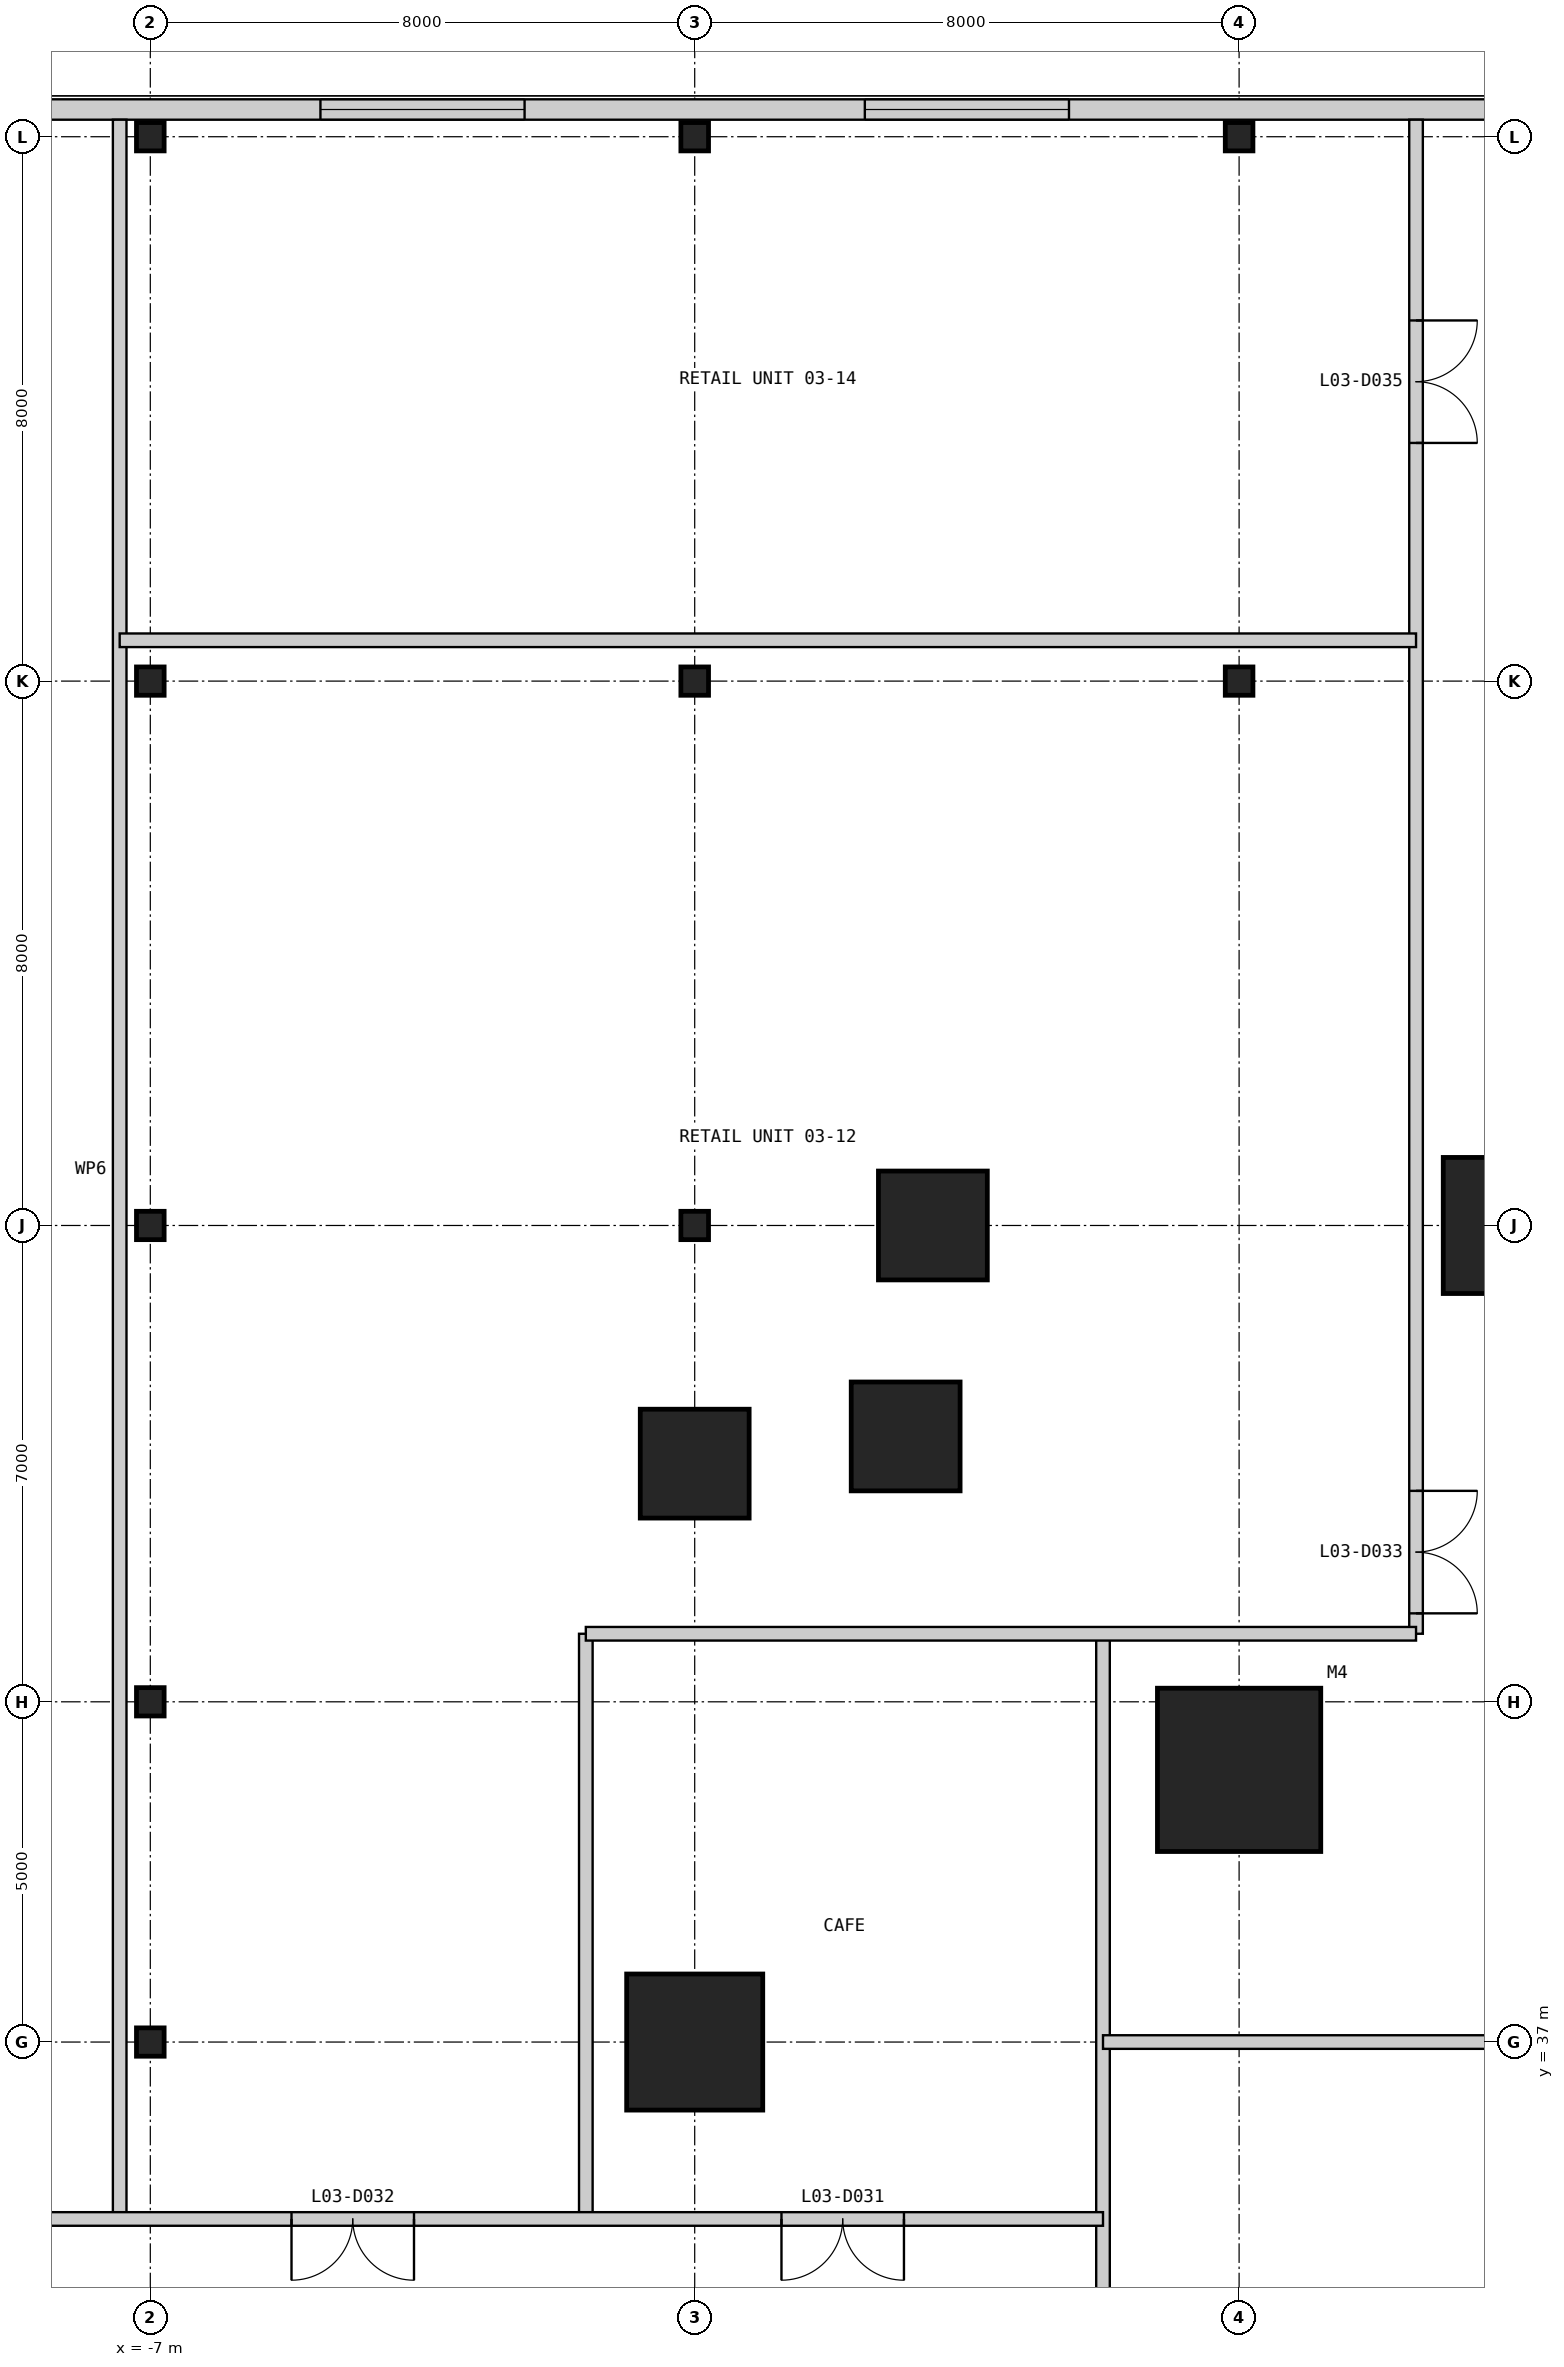
"""IFC4 building model, lengths in metres.
Left out: names, types, materials, properties, quantities, classifications, styles, units other than length and angle.
Written with IfcOpenShell. Run it as: python <this file> out.ifc"""

import sys

from ifc_helpers import new_model, si_unit, direction, frame, frame_2d, origin, origin_2d, place, context, subcontext, project, spatial, rectangle, i_section, extrude, element, fill, save


model = new_model("IFC4")
c1 = context("Model", 3, precision=1e-05, world=origin(), true_north=direction((0.0, 1.0)))
c2 = subcontext(c1, "Body", "Model", "MODEL_VIEW")
j1 = project(units=[si_unit("LENGTHUNIT", "METRE"), si_unit("PLANEANGLEUNIT", "RADIAN")], contexts=[c1])
p1 = place(None, origin())
s1 = spatial("IfcSite", under=j1, at=p1, CompositionType="ELEMENT")
p2 = place(p1, origin())
s2 = spatial("IfcBuilding", under=s1, at=p2, CompositionType="ELEMENT")
p3 = place(p2, frame((0.0, 0.0, 16.6)))
s3 = spatial("IfcBuildingStorey", under=s2, at=p3, CompositionType="ELEMENT", Elevation=16.6)
p4 = place(p3, frame((9.0, 41.0, 0.0), z_axis=(0.0, 0.0, 1.0), x_axis=(1.0, 0.0, 0.0)))
e1 = element("IfcColumn", 1, at=p4, inside=s3, PredefinedType="COLUMN", context=c2, shape_type="SweptSolid", body=[
    extrude(rectangle(XDim=2.4, YDim=2.4, at=origin_2d()), origin(), (0.0, 0.0, 1.0), 4.8),
])
p5 = place(p3, frame((13.0, 49.0, 0.0), z_axis=(0.0, 0.0, 1.0), x_axis=(1.0, 0.0, 0.0)))
e2 = element("IfcColumn", 2, at=p5, inside=s3, PredefinedType="COLUMN", context=c2, shape_type="SweptSolid", body=[
    extrude(rectangle(XDim=2.0, YDim=2.0, at=origin_2d()), origin(), (0.0, 0.0, 1.0), 4.8),
])
for number, where, z_axis, x_axis in (
    (3, (4.5, 49.0, 0.0), (0.0, 0.0, 1.0), (1.0, 0.0, 0.0)),
    (4, (4.1, 45.9, 0.0), (0.0, 0.0, 1.0), (1.0, 0.0, 0.0)),
    (5, (1.0, 45.5, 0.0), (0.0, 0.0, 1.0), (1.0, 0.0, 0.0)),
):
    element("IfcColumn", number, at=place(p3, frame(where, z_axis=z_axis, x_axis=x_axis)), inside=s3, PredefinedType="COLUMN", context=c2, shape_type="SweptSolid", body=[
        extrude(rectangle(XDim=1.6, YDim=1.6, at=origin_2d()), origin(), (0.0, 0.0, 1.0), 4.8),
    ])
p6 = place(p3, frame((1.0, 37.0, 0.0), z_axis=(0.0, 0.0, 1.0), x_axis=(1.0, 0.0, 0.0)))
e6 = element("IfcColumn", 6, at=p6, inside=s3, PredefinedType="COLUMN", context=c2, shape_type="SweptSolid", body=[
    extrude(rectangle(XDim=2.0, YDim=2.0, at=origin_2d()), origin(), (0.0, 0.0, 1.0), 4.8),
])
for number, where, z_axis, x_axis in (
    (7, (-7.0, 37.0, 0.0), (0.0, 0.0, 1.0), (1.0, 0.0, 0.0)),
    (8, (-7.0, 42.0, 0.0), (0.0, 0.0, 1.0), (1.0, 0.0, 0.0)),
    (9, (-7.0, 49.0, 0.0), (0.0, 0.0, 1.0), (1.0, 0.0, 0.0)),
    (10, (-7.0, 57.0, 0.0), (0.0, 0.0, 1.0), (1.0, 0.0, 0.0)),
    (11, (-7.0, 65.0, 0.0), (0.0, 0.0, 1.0), (1.0, 0.0, 0.0)),
    (12, (1.0, 49.0, 0.0), (0.0, 0.0, 1.0), (1.0, 0.0, 0.0)),
    (13, (1.0, 57.0, 0.0), (0.0, 0.0, 1.0), (1.0, 0.0, 0.0)),
    (14, (1.0, 65.0, 0.0), (0.0, 0.0, 1.0), (1.0, 0.0, 0.0)),
    (15, (9.0, 57.0, 0.0), (0.0, 0.0, 1.0), (1.0, 0.0, 0.0)),
    (16, (9.0, 65.0, 0.0), (0.0, 0.0, 1.0), (1.0, 0.0, 0.0)),
):
    element("IfcColumn", number, at=place(p3, frame(where, z_axis=z_axis, x_axis=x_axis)), inside=s3, PredefinedType="COLUMN", context=c2, shape_type="SweptSolid", body=[
        extrude(i_section(OverallWidth=0.406, OverallDepth=0.417, WebThickness=0.03, FlangeThickness=0.048, at=origin_2d()), origin(), (0.0, 0.0, 1.0), 4.8),
    ])
p7 = place(p3, frame((57.55, 65.4, 0.0), z_axis=(0.0, 0.0, 1.0), x_axis=(-1.0, 0.0, 0.0)))
e17 = element("IfcWall", 17, at=p7, inside=s3, PredefinedType="SOLIDWALL", context=c2, shape_type="SweptSolid", body=[
    extrude(rectangle(XDim=73.1, YDim=0.3, at=frame_2d((36.55, 0.0))), origin(), (0.0, 0.0, 1.0), 4.5),
])
p8 = place(p7, frame((67.05, 0.0, 0.9)))
e18 = element("IfcOpeningElement", 18, at=p8, cuts=e17, PredefinedType="OPENING", context=c2, shape_type="SweptSolid", body=[
    extrude(rectangle(XDim=3.0, YDim=2.4, at=frame_2d((1.5, 1.2))), frame((0.0, 0.16, 0.0), z_axis=(0.0, -1.0, 0.0), x_axis=(1.0, 0.0, 0.0)), (0.0, 0.0, 1.0), 0.32),
])
p9 = place(p7, frame((59.05, 0.0, 0.9)))
e19 = element("IfcOpeningElement", 19, at=p9, cuts=e17, PredefinedType="OPENING", context=c2, shape_type="SweptSolid", body=[
    extrude(rectangle(XDim=3.0, YDim=2.4, at=frame_2d((1.5, 1.2))), frame((0.0, 0.16, 0.0), z_axis=(0.0, -1.0, 0.0), x_axis=(1.0, 0.0, 0.0)), (0.0, 0.0, 1.0), 0.32),
])
p10 = place(p7, frame((51.05, 0.0, 0.9)))
e20 = element("IfcOpeningElement", 20, at=p10, cuts=e17, PredefinedType="OPENING", context=c2, shape_type="SweptSolid", body=[
    extrude(rectangle(XDim=3.0, YDim=2.4, at=frame_2d((1.5, 1.2))), frame((0.0, 0.16, 0.0), z_axis=(0.0, -1.0, 0.0), x_axis=(1.0, 0.0, 0.0)), (0.0, 0.0, 1.0), 0.32),
])
p11 = place(p7, frame((37.05, 0.0, 0.9)))
e21 = element("IfcOpeningElement", 21, at=p11, cuts=e17, PredefinedType="OPENING", context=c2, shape_type="SweptSolid", body=[
    extrude(rectangle(XDim=3.0, YDim=2.4, at=frame_2d((1.5, 1.2))), frame((0.0, 0.16, 0.0), z_axis=(0.0, -1.0, 0.0), x_axis=(1.0, 0.0, 0.0)), (0.0, 0.0, 1.0), 0.32),
])
p12 = place(p7, frame((25.05, 0.0, 0.9)))
e22 = element("IfcOpeningElement", 22, at=p12, cuts=e17, PredefinedType="OPENING", context=c2, shape_type="SweptSolid", body=[
    extrude(rectangle(XDim=3.0, YDim=2.4, at=frame_2d((1.5, 1.2))), frame((0.0, 0.16, 0.0), z_axis=(0.0, -1.0, 0.0), x_axis=(1.0, 0.0, 0.0)), (0.0, 0.0, 1.0), 0.32),
])
p13 = place(p7, frame((16.55, 0.0, 0.9)))
e23 = element("IfcOpeningElement", 23, at=p13, cuts=e17, PredefinedType="OPENING", context=c2, shape_type="SweptSolid", body=[
    extrude(rectangle(XDim=3.0, YDim=2.4, at=frame_2d((1.5, 1.2))), frame((0.0, 0.16, 0.0), z_axis=(0.0, -1.0, 0.0), x_axis=(1.0, 0.0, 0.0)), (0.0, 0.0, 1.0), 0.32),
])
p14 = place(p7, frame((10.55, 0.0, 0.9)))
e24 = element("IfcOpeningElement", 24, at=p14, cuts=e17, PredefinedType="OPENING", context=c2, shape_type="SweptSolid", body=[
    extrude(rectangle(XDim=3.0, YDim=2.4, at=frame_2d((1.5, 1.2))), frame((0.0, 0.16, 0.0), z_axis=(0.0, -1.0, 0.0), x_axis=(1.0, 0.0, 0.0)), (0.0, 0.0, 1.0), 0.32),
])
p15 = place(p7, frame((3.05, 0.0, 0.9)))
e25 = element("IfcOpeningElement", 25, at=p15, cuts=e17, PredefinedType="OPENING", context=c2, shape_type="SweptSolid", body=[
    extrude(rectangle(XDim=3.0, YDim=2.4, at=frame_2d((1.5, 1.2))), frame((0.0, 0.16, 0.0), z_axis=(0.0, -1.0, 0.0), x_axis=(1.0, 0.0, 0.0)), (0.0, 0.0, 1.0), 0.32),
])
p16 = place(p3, frame((-7.45, 34.4, 0.0), z_axis=(0.0, 0.0, 1.0), x_axis=(0.0, 1.0, 0.0)))
e26 = element("IfcWall", 26, at=p16, inside=s3, PredefinedType="PARTITIONING", context=c2, shape_type="SweptSolid", body=[
    extrude(rectangle(XDim=30.85, YDim=0.2, at=frame_2d((15.425, 0.0))), origin(), (0.0, 0.0, 1.0), 4.5),
])
p17 = place(p3, frame((-0.6, 34.4, 0.0), z_axis=(0.0, 0.0, 1.0), x_axis=(0.0, 1.0, 0.0)))
e27 = element("IfcWall", 27, at=p17, inside=s3, PredefinedType="PARTITIONING", context=c2, shape_type="SweptSolid", body=[
    extrude(rectangle(XDim=8.6, YDim=0.2, at=frame_2d((4.3, 0.0))), origin(), (0.0, 0.0, 1.0), 4.5),
])
p18 = place(p3, frame((7.0, 22.0, 0.0), z_axis=(0.0, 0.0, 1.0), x_axis=(0.0, 1.0, 0.0)))
e28 = element("IfcWall", 28, at=p18, inside=s3, PredefinedType="PARTITIONING", context=c2, shape_type="SweptSolid", body=[
    extrude(rectangle(XDim=21.0, YDim=0.2, at=frame_2d((10.5, 0.0))), origin(), (0.0, 0.0, 1.0), 3.843),
])
p19 = place(p3, frame((11.6, 43.0, 0.0), z_axis=(0.0, 0.0, 1.0), x_axis=(0.0, 1.0, 0.0)))
e29 = element("IfcWall", 29, at=p19, inside=s3, PredefinedType="PARTITIONING", context=c2, shape_type="SweptSolid", body=[
    extrude(rectangle(XDim=22.25, YDim=0.2, at=frame_2d((11.125, 0.0))), origin(), (0.0, 0.0, 1.0), 4.5),
])
p20 = place(p19, frame((0.3, 0.0, 0.0)))
e30 = element("IfcOpeningElement", 30, at=p20, cuts=e29, PredefinedType="OPENING", context=c2, shape_type="SweptSolid", body=[
    extrude(rectangle(XDim=1.8, YDim=2.4, at=frame_2d((0.9, 1.2))), frame((0.0, 0.11, 0.0), z_axis=(0.0, -1.0, 0.0), x_axis=(1.0, 0.0, 0.0)), (0.0, 0.0, 1.0), 0.22),
])
p21 = place(p19, frame((17.5, 0.0, 0.0)))
e31 = element("IfcOpeningElement", 31, at=p21, cuts=e29, PredefinedType="OPENING", context=c2, shape_type="SweptSolid", body=[
    extrude(rectangle(XDim=1.8, YDim=2.4, at=frame_2d((0.9, 1.2))), frame((0.0, 0.11, 0.0), z_axis=(0.0, -1.0, 0.0), x_axis=(1.0, 0.0, 0.0)), (0.0, 0.0, 1.0), 0.22),
])
p22 = place(p3, frame((-15.25, 34.4, 0.0), z_axis=(0.0, 0.0, 1.0), x_axis=(1.0, 0.0, 0.0)))
e32 = element("IfcWall", 32, at=p22, inside=s3, PredefinedType="PARTITIONING", context=c2, shape_type="SweptSolid", body=[
    extrude(rectangle(XDim=22.25, YDim=0.2, at=frame_2d((11.125, 0.0))), origin(), (0.0, 0.0, 1.0), 4.5),
])
p23 = place(p22, frame((17.525, 0.0, 0.0)))
e33 = element("IfcOpeningElement", 33, at=p23, cuts=e32, PredefinedType="OPENING", context=c2, shape_type="SweptSolid", body=[
    extrude(rectangle(XDim=1.8, YDim=2.4, at=frame_2d((0.9, 1.2))), frame((0.0, 0.11, 0.0), z_axis=(0.0, -1.0, 0.0), x_axis=(1.0, 0.0, 0.0)), (0.0, 0.0, 1.0), 0.22),
])
p24 = place(p22, frame((10.325, 0.0, 0.0)))
e34 = element("IfcOpeningElement", 34, at=p24, cuts=e32, PredefinedType="OPENING", context=c2, shape_type="SweptSolid", body=[
    extrude(rectangle(XDim=1.8, YDim=2.4, at=frame_2d((0.9, 1.2))), frame((0.0, 0.11, 0.0), z_axis=(0.0, -1.0, 0.0), x_axis=(1.0, 0.0, 0.0)), (0.0, 0.0, 1.0), 0.22),
])
p25 = place(p22, frame((3.025, 0.0, 0.0)))
e35 = element("IfcOpeningElement", 35, at=p25, cuts=e32, PredefinedType="OPENING", context=c2, shape_type="SweptSolid", body=[
    extrude(rectangle(XDim=1.8, YDim=2.4, at=frame_2d((0.9, 1.2))), frame((0.0, 0.11, 0.0), z_axis=(0.0, -1.0, 0.0), x_axis=(1.0, 0.0, 0.0)), (0.0, 0.0, 1.0), 0.22),
])
p26 = place(p3, frame((7.0, 37.0, 0.0), z_axis=(0.0, 0.0, 1.0), x_axis=(1.0, 0.0, 0.0)))
e36 = element("IfcWall", 36, at=p26, inside=s3, PredefinedType="PARTITIONING", context=c2, shape_type="SweptSolid", body=[
    extrude(rectangle(XDim=6.0, YDim=0.2, at=frame_2d((3.0, 0.0))), origin(), (0.0, 0.0, 1.0), 3.653),
])
p27 = place(p3, frame((-0.6, 43.0, 0.0), z_axis=(0.0, 0.0, 1.0), x_axis=(1.0, 0.0, 0.0)))
e37 = element("IfcWall", 37, at=p27, inside=s3, PredefinedType="PARTITIONING", context=c2, shape_type="SweptSolid", body=[
    extrude(rectangle(XDim=12.2, YDim=0.2, at=frame_2d((6.1, 0.0))), origin(), (0.0, 0.0, 1.0), 4.5),
])
p28 = place(p3, frame((-7.45, 57.6, 0.0), z_axis=(0.0, 0.0, 1.0), x_axis=(1.0, 0.0, 0.0)))
e38 = element("IfcWall", 38, at=p28, inside=s3, PredefinedType="PARTITIONING", context=c2, shape_type="SweptSolid", body=[
    extrude(rectangle(XDim=19.05, YDim=0.2, at=frame_2d((9.525, 0.0))), origin(), (0.0, 0.0, 1.0), 4.5),
])
p29 = place(p9, origin())
e39 = element("IfcWindow", 39, at=p29, inside=s3, PartitioningType="SINGLE_PANEL", PredefinedType="WINDOW", context=c2, shape_type="SweptSolid", body=[
    extrude(rectangle(XDim=3.0, YDim=2.4, at=frame_2d((1.5, 1.2))), frame((0.0, 0.03, 0.0), z_axis=(0.0, -1.0, 0.0), x_axis=(1.0, 0.0, 0.0)), (0.0, 0.0, 1.0), 0.06),
])
fill(e19, e39)
p30 = place(p10, origin())
e40 = element("IfcWindow", 40, at=p30, inside=s3, PartitioningType="SINGLE_PANEL", PredefinedType="WINDOW", context=c2, shape_type="SweptSolid", body=[
    extrude(rectangle(XDim=3.0, YDim=2.4, at=frame_2d((1.5, 1.2))), frame((0.0, 0.03, 0.0), z_axis=(0.0, -1.0, 0.0), x_axis=(1.0, 0.0, 0.0)), (0.0, 0.0, 1.0), 0.06),
])
fill(e20, e40)
p31 = place(p23, frame((1.8, 0.0, 0.0), z_axis=(0.0, 0.0, 1.0), x_axis=(-1.0, 0.0, 0.0)))
e41 = element("IfcDoor", 41, at=p31, inside=s3, OperationType="DOUBLE_DOOR_SINGLE_SWING", PredefinedType="DOOR", context=c2, shape_type="SweptSolid", body=[
    extrude(rectangle(XDim=1.8, YDim=2.4, at=frame_2d((0.9, 1.2))), frame((0.0, 0.025, 0.0), z_axis=(0.0, -1.0, 0.0), x_axis=(1.0, 0.0, 0.0)), (0.0, 0.0, 1.0), 0.05),
])
fill(e33, e41)
p32 = place(p24, frame((1.8, 0.0, 0.0), z_axis=(0.0, 0.0, 1.0), x_axis=(-1.0, 0.0, 0.0)))
e42 = element("IfcDoor", 42, at=p32, inside=s3, OperationType="DOUBLE_DOOR_SINGLE_SWING", PredefinedType="DOOR", context=c2, shape_type="SweptSolid", body=[
    extrude(rectangle(XDim=1.8, YDim=2.4, at=frame_2d((0.9, 1.2))), frame((0.0, 0.025, 0.0), z_axis=(0.0, -1.0, 0.0), x_axis=(1.0, 0.0, 0.0)), (0.0, 0.0, 1.0), 0.05),
])
fill(e34, e42)
p33 = place(p20, frame((1.8, 0.0, 0.0), z_axis=(0.0, 0.0, 1.0), x_axis=(-1.0, 0.0, 0.0)))
e43 = element("IfcDoor", 43, at=p33, inside=s3, OperationType="DOUBLE_DOOR_SINGLE_SWING", PredefinedType="DOOR", context=c2, shape_type="SweptSolid", body=[
    extrude(rectangle(XDim=1.8, YDim=2.4, at=frame_2d((0.9, 1.2))), frame((0.0, 0.025, 0.0), z_axis=(0.0, -1.0, 0.0), x_axis=(1.0, 0.0, 0.0)), (0.0, 0.0, 1.0), 0.05),
])
fill(e30, e43)
p34 = place(p21, frame((1.8, 0.0, 0.0), z_axis=(0.0, 0.0, 1.0), x_axis=(-1.0, 0.0, 0.0)))
e44 = element("IfcDoor", 44, at=p34, inside=s3, OperationType="DOUBLE_DOOR_SINGLE_SWING", PredefinedType="DOOR", context=c2, shape_type="SweptSolid", body=[
    extrude(rectangle(XDim=1.8, YDim=2.4, at=frame_2d((0.9, 1.2))), frame((0.0, 0.025, 0.0), z_axis=(0.0, -1.0, 0.0), x_axis=(1.0, 0.0, 0.0)), (0.0, 0.0, 1.0), 0.05),
])
fill(e31, e44)
save(model, sys.argv[1])
